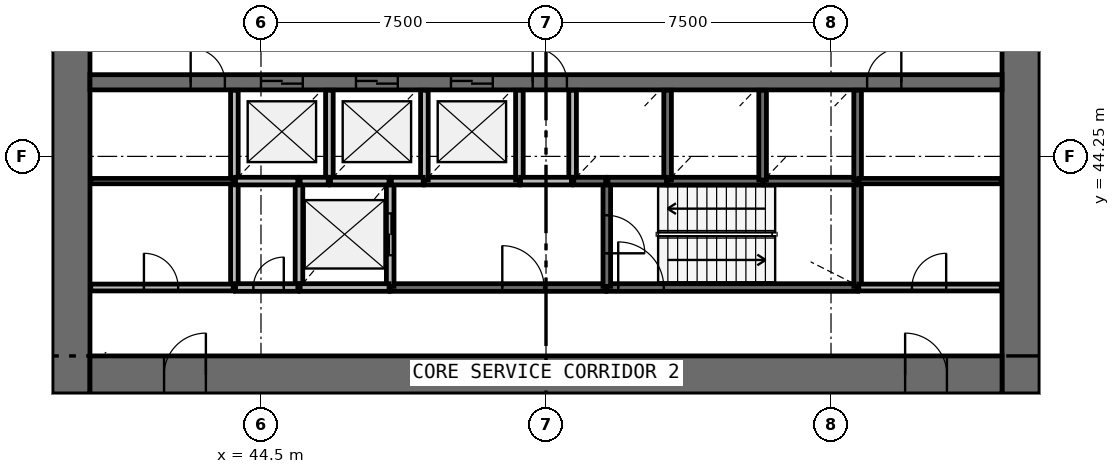
"""IFC4 building model, lengths in metres.
Left out: names, types, materials, properties, quantities, classifications, styles, units other than length and angle.
Written with IfcOpenShell. Run it as: python <this file> out.ifc"""

import sys

from ifc_helpers import new_model, si_unit, direction, frame, frame_2d, origin, place, context, subcontext, project, spatial, rectangle, extrude, source, transform, mapped, element, fill, save


model = new_model("IFC4")
c1 = context("Model", 3, precision=1e-05, world=origin(), true_north=direction((0.0, 1.0)))
c2 = subcontext(c1, "Body", "Model", "MODEL_VIEW")
j1 = project(units=[si_unit("LENGTHUNIT", "METRE"), si_unit("PLANEANGLEUNIT", "RADIAN")], contexts=[c1])
p1 = place(None, origin())
s1 = spatial("IfcSite", under=j1, at=p1, CompositionType="ELEMENT")
p2 = place(p1, origin())
s2 = spatial("IfcBuilding", under=s1, at=p2, CompositionType="ELEMENT")
p3 = place(p2, frame((0.0, 0.0, 22.6)))
s3 = spatial("IfcBuildingStorey", under=s2, at=p3, CompositionType="ELEMENT", Elevation=22.6)
p4 = place(p3, frame((64.5, 38.0, 0.0), z_axis=(0.0, 0.0, 1.0), x_axis=(0.0, 1.0, 0.0)))
e1 = element("IfcWall", 1, at=p4, inside=s3, PredefinedType="SHEAR", context=c2, shape_type="SweptSolid", body=[
    extrude(rectangle(XDim=20.0, YDim=1.0, at=frame_2d((10.0, 0.0))), origin(), (0.0, 0.0, 1.0), 4.4),
])
p5 = place(p4, frame((9.1, 0.0, 0.0)))
e2 = element("IfcOpeningElement", 2, at=p5, cuts=e1, PredefinedType="OPENING", context=c2, shape_type="SweptSolid", body=[
    extrude(rectangle(XDim=1.8, YDim=2.1, at=frame_2d((0.9, 1.05))), frame((0.0, 0.51, 0.0), z_axis=(0.0, -1.0, 0.0), x_axis=(1.0, 0.0, 0.0)), (0.0, 0.0, 1.0), 1.02),
])
p6 = place(p3, frame((39.5, 58.0, 0.0), z_axis=(0.0, 0.0, 1.0), x_axis=(0.0, -1.0, 0.0)))
e3 = element("IfcWall", 3, at=p6, inside=s3, PredefinedType="SHEAR", context=c2, shape_type="SweptSolid", body=[
    extrude(rectangle(XDim=20.0, YDim=1.0, at=frame_2d((10.0, 0.0))), origin(), (0.0, 0.0, 1.0), 4.4),
])
p7 = place(p6, frame((9.1, 0.0, 0.0)))
e4 = element("IfcOpeningElement", 4, at=p7, cuts=e3, PredefinedType="OPENING", context=c2, shape_type="SweptSolid", body=[
    extrude(rectangle(XDim=1.8, YDim=2.1, at=frame_2d((0.9, 1.05))), frame((0.0, 0.51, 0.0), z_axis=(0.0, -1.0, 0.0), x_axis=(1.0, 0.0, 0.0)), (0.0, 0.0, 1.0), 1.02),
])
p8 = place(p3, frame((40.0, 38.5, 0.0), z_axis=(0.0, 0.0, 1.0), x_axis=(1.0, 0.0, 0.0)))
e5 = element("IfcWall", 5, at=p8, inside=s3, PredefinedType="SHEAR", context=c2, shape_type="SweptSolid", body=[
    extrude(rectangle(XDim=24.0, YDim=1.0, at=frame_2d((12.0, 0.0))), origin(), (0.0, 0.0, 1.0), 4.4),
])
p9 = place(p8, frame((21.45, 0.0, 0.0)))
e6 = element("IfcOpeningElement", 6, at=p9, cuts=e5, PredefinedType="OPENING", context=c2, shape_type="SweptSolid", body=[
    extrude(rectangle(XDim=1.1, YDim=2.1, at=frame_2d((0.55, 1.05))), frame((0.0, 0.51, 0.0), z_axis=(0.0, -1.0, 0.0), x_axis=(1.0, 0.0, 0.0)), (0.0, 0.0, 1.0), 1.02),
])
p10 = place(p8, frame((1.95, 0.0, 0.0)))
e7 = element("IfcOpeningElement", 7, at=p10, cuts=e5, PredefinedType="OPENING", context=c2, shape_type="SweptSolid", body=[
    extrude(rectangle(XDim=1.1, YDim=2.1, at=frame_2d((0.55, 1.05))), frame((0.0, 0.51, 0.0), z_axis=(0.0, -1.0, 0.0), x_axis=(1.0, 0.0, 0.0)), (0.0, 0.0, 1.0), 1.02),
])
p11 = place(p3, frame((40.0, 46.2, 0.0), z_axis=(0.0, 0.0, 1.0), x_axis=(1.0, 0.0, 0.0)))
e8 = element("IfcWall", 8, at=p11, inside=s3, PredefinedType="SHEAR", context=c2, shape_type="SweptSolid", body=[
    extrude(rectangle(XDim=24.0, YDim=0.4, at=frame_2d((12.0, 0.0))), origin(), (0.0, 0.0, 1.0), 4.4),
])
p12 = place(p11, frame((4.5, 0.0, 0.0)))
e9 = element("IfcOpeningElement", 9, at=p12, cuts=e8, PredefinedType="OPENING", context=c2, shape_type="SweptSolid", body=[
    extrude(rectangle(XDim=1.1, YDim=2.1, at=frame_2d((0.55, 1.05))), frame((0.0, 0.21, 0.0), z_axis=(0.0, -1.0, 0.0), x_axis=(1.0, 0.0, 0.0)), (0.0, 0.0, 1.0), 0.42),
])
p13 = place(p11, frame((7.0, 0.0, 0.0)))
e10 = element("IfcOpeningElement", 10, at=p13, cuts=e8, PredefinedType="OPENING", context=c2, shape_type="SweptSolid", body=[
    extrude(rectangle(XDim=1.1, YDim=2.1, at=frame_2d((0.55, 1.05))), frame((0.0, 0.21, 0.0), z_axis=(0.0, -1.0, 0.0), x_axis=(1.0, 0.0, 0.0)), (0.0, 0.0, 1.0), 0.42),
])
p14 = place(p11, frame((9.5, 0.0, 0.0)))
e11 = element("IfcOpeningElement", 11, at=p14, cuts=e8, PredefinedType="OPENING", context=c2, shape_type="SweptSolid", body=[
    extrude(rectangle(XDim=1.1, YDim=2.1, at=frame_2d((0.55, 1.05))), frame((0.0, 0.21, 0.0), z_axis=(0.0, -1.0, 0.0), x_axis=(1.0, 0.0, 0.0)), (0.0, 0.0, 1.0), 0.42),
])
p15 = place(p11, frame((20.45, 0.0, 0.0)))
e12 = element("IfcOpeningElement", 12, at=p15, cuts=e8, PredefinedType="OPENING", context=c2, shape_type="SweptSolid", body=[
    extrude(rectangle(XDim=0.9, YDim=2.1, at=frame_2d((0.45, 1.05))), frame((0.0, 0.21, 0.0), z_axis=(0.0, -1.0, 0.0), x_axis=(1.0, 0.0, 0.0)), (0.0, 0.0, 1.0), 0.42),
])
p16 = place(p11, frame((2.65, 0.0, 0.0)))
e13 = element("IfcOpeningElement", 13, at=p16, cuts=e8, PredefinedType="OPENING", context=c2, shape_type="SweptSolid", body=[
    extrude(rectangle(XDim=0.9, YDim=2.1, at=frame_2d((0.45, 1.05))), frame((0.0, 0.21, 0.0), z_axis=(0.0, -1.0, 0.0), x_axis=(1.0, 0.0, 0.0)), (0.0, 0.0, 1.0), 0.42),
])
p17 = place(p11, frame((11.65, 0.0, 0.0)))
e14 = element("IfcOpeningElement", 14, at=p17, cuts=e8, PredefinedType="OPENING", context=c2, shape_type="SweptSolid", body=[
    extrude(rectangle(XDim=0.9, YDim=2.1, at=frame_2d((0.45, 1.05))), frame((0.0, 0.21, 0.0), z_axis=(0.0, -1.0, 0.0), x_axis=(1.0, 0.0, 0.0)), (0.0, 0.0, 1.0), 0.42),
])
p18 = place(p3, frame((53.6, 40.8, 0.0), z_axis=(0.0, 0.0, 1.0), x_axis=(1.0, 0.0, 0.0)))
e15 = element("IfcWall", 15, at=p18, inside=s3, PredefinedType="SOLIDWALL", context=c2, shape_type="SweptSolid", body=[
    extrude(rectangle(XDim=6.6, YDim=0.2, at=frame_2d((3.3, 0.0))), origin(), (0.0, 0.0, 1.0), 3.95),
])
p19 = place(p18, frame((0.3, 0.0, 0.0)))
e16 = element("IfcOpeningElement", 16, at=p19, cuts=e15, PredefinedType="OPENING", context=c2, shape_type="SweptSolid", body=[
    extrude(rectangle(XDim=1.2, YDim=2.1, at=frame_2d((0.6, 1.05))), frame((0.0, 0.11, 0.0), z_axis=(0.0, -1.0, 0.0), x_axis=(1.0, 0.0, 0.0)), (0.0, 0.0, 1.0), 0.22),
])
p20 = place(p3, frame((47.9, 40.8, 0.0), z_axis=(0.0, 0.0, 1.0), x_axis=(1.0, 0.0, 0.0)))
e17 = element("IfcWall", 17, at=p20, inside=s3, PredefinedType="SOLIDWALL", context=c2, shape_type="SweptSolid", body=[
    extrude(rectangle(XDim=5.67, YDim=0.2, at=frame_2d((2.835, 0.0))), origin(), (0.0, 0.0, 1.0), 3.95),
])
p21 = place(p20, frame((2.95, 0.0, 0.0)))
e18 = element("IfcOpeningElement", 18, at=p21, cuts=e17, PredefinedType="OPENING", context=c2, shape_type="SweptSolid", body=[
    extrude(rectangle(XDim=1.1, YDim=2.1, at=frame_2d((0.55, 1.05))), frame((0.0, 0.11, 0.0), z_axis=(0.0, -1.0, 0.0), x_axis=(1.0, 0.0, 0.0)), (0.0, 0.0, 1.0), 0.22),
])
for number, where, z_axis, x_axis in (
    (19, (43.8, 43.6, 0.0), (0.0, 0.0, 1.0), (0.0, -1.0, 0.0)),
    (20, (45.5, 43.6, 0.0), (0.0, 0.0, 1.0), (0.0, -1.0, 0.0)),
):
    element("IfcWall", number, at=place(p3, frame(where, z_axis=z_axis, x_axis=x_axis)), inside=s3, PredefinedType="SOLIDWALL", context=c2, shape_type="SweptSolid", body=[
        extrude(rectangle(XDim=2.8, YDim=0.2, at=frame_2d((1.4, 0.0))), origin(), (0.0, 0.0, 1.0), 3.95),
    ])
p22 = place(p3, frame((47.9, 40.83, 0.0), z_axis=(0.0, 0.0, 1.0), x_axis=(0.0, 1.0, 0.0)))
e21 = element("IfcWall", 21, at=p22, inside=s3, PredefinedType="SOLIDWALL", context=c2, shape_type="SweptSolid", body=[
    extrude(rectangle(XDim=2.77, YDim=0.2, at=frame_2d((1.385, 0.0))), origin(), (0.0, 0.0, 1.0), 3.95),
])
p23 = place(p22, frame((0.82, 0.0, 0.0)))
e22 = element("IfcOpeningElement", 22, at=p23, cuts=e21, PredefinedType="OPENING", context=c2, shape_type="SweptSolid", body=[
    extrude(rectangle(XDim=1.1, YDim=2.1, at=frame_2d((0.55, 1.05))), frame((0.0, 0.11, 0.0), z_axis=(0.0, -1.0, 0.0), x_axis=(1.0, 0.0, 0.0)), (0.0, 0.0, 1.0), 0.22),
])
p24 = place(p3, frame((60.2, 40.83, 0.0), z_axis=(0.0, 0.0, 1.0), x_axis=(0.0, 1.0, 0.0)))
e23 = element("IfcWall", 23, at=p24, inside=s3, PredefinedType="SOLIDWALL", context=c2, shape_type="SweptSolid", body=[
    extrude(rectangle(XDim=2.77, YDim=0.2, at=frame_2d((1.385, 0.0))), origin(), (0.0, 0.0, 1.0), 3.95),
])
p25 = place(p3, frame((53.6, 43.6, 0.0), z_axis=(0.0, 0.0, 1.0), x_axis=(0.0, -1.0, 0.0)))
e24 = element("IfcWall", 24, at=p25, inside=s3, PredefinedType="SOLIDWALL", context=c2, shape_type="SweptSolid", body=[
    extrude(rectangle(XDim=2.77, YDim=0.2, at=frame_2d((1.385, 0.0))), origin(), (0.0, 0.0, 1.0), 3.95),
])
p26 = place(p25, frame((0.9, 0.0, 0.0)))
e25 = element("IfcOpeningElement", 25, at=p26, cuts=e24, PredefinedType="OPENING", context=c2, shape_type="SweptSolid", body=[
    extrude(rectangle(XDim=1.0, YDim=2.1, at=frame_2d((0.5, 1.05))), frame((0.0, 0.11, 0.0), z_axis=(0.0, -1.0, 0.0), x_axis=(1.0, 0.0, 0.0)), (0.0, 0.0, 1.0), 0.22),
])
for number, where, z_axis, x_axis in (
    (26, (48.8, 43.6, 0.0), (0.0, 0.0, 1.0), (1.0, 0.0, 0.0)),
    (27, (55.2, 43.6, 0.0), (0.0, 0.0, 1.0), (1.0, 0.0, 0.0)),
):
    element("IfcWall", number, at=place(p3, frame(where, z_axis=z_axis, x_axis=x_axis)), inside=s3, PredefinedType="SOLIDWALL", context=c2, shape_type="SweptSolid", body=[
        extrude(rectangle(XDim=2.5, YDim=0.2, at=frame_2d((1.25, 0.0))), origin(), (0.0, 0.0, 1.0), 3.95),
    ])
p27 = place(p3, frame((57.73, 43.6, 0.0), z_axis=(0.0, 0.0, 1.0), x_axis=(1.0, 0.0, 0.0)))
e28 = element("IfcWall", 28, at=p27, inside=s3, PredefinedType="SOLIDWALL", context=c2, shape_type="SweptSolid", body=[
    extrude(rectangle(XDim=2.44, YDim=0.2, at=frame_2d((1.22, 0.0))), origin(), (0.0, 0.0, 1.0), 3.95),
])
p28 = place(p3, frame((45.53, 40.8, 0.0), z_axis=(0.0, 0.0, 1.0), x_axis=(1.0, 0.0, 0.0)))
e29 = element("IfcWall", 29, at=p28, inside=s3, PredefinedType="SOLIDWALL", context=c2, shape_type="SweptSolid", body=[
    extrude(rectangle(XDim=2.34, YDim=0.2, at=frame_2d((1.17, 0.0))), origin(), (0.0, 0.0, 1.0), 3.95),
])
p29 = place(p3, frame((43.8, 45.99, 0.0), z_axis=(0.0, 0.0, 1.0), x_axis=(0.0, -1.0, 0.0)))
e30 = element("IfcWall", 30, at=p29, inside=s3, PredefinedType="SOLIDWALL", context=c2, shape_type="SweptSolid", body=[
    extrude(rectangle(XDim=2.36, YDim=0.2, at=frame_2d((1.18, 0.0))), origin(), (0.0, 0.0, 1.0), 3.95),
])
p30 = place(p3, frame((46.3, 43.6, 0.0), z_axis=(0.0, 0.0, 1.0), x_axis=(0.0, 1.0, 0.0)))
e31 = element("IfcWall", 31, at=p30, inside=s3, PredefinedType="SOLIDWALL", context=c2, shape_type="SweptSolid", body=[
    extrude(rectangle(XDim=2.39, YDim=0.2, at=frame_2d((1.195, 0.0))), origin(), (0.0, 0.0, 1.0), 3.95),
])
for number, where, z_axis, x_axis in (
    (32, (48.8, 43.63, 0.0), (0.0, 0.0, 1.0), (0.0, 1.0, 0.0)),
    (33, (51.3, 43.63, 0.0), (0.0, 0.0, 1.0), (0.0, 1.0, 0.0)),
):
    element("IfcWall", number, at=place(p3, frame(where, z_axis=z_axis, x_axis=x_axis)), inside=s3, PredefinedType="SOLIDWALL", context=c2, shape_type="SweptSolid", body=[
        extrude(rectangle(XDim=2.36, YDim=0.2, at=frame_2d((1.18, 0.0))), origin(), (0.0, 0.0, 1.0), 3.95),
    ])
p31 = place(p3, frame((52.7, 45.99, 0.0), z_axis=(0.0, 0.0, 1.0), x_axis=(0.0, -1.0, 0.0)))
e34 = element("IfcWall", 34, at=p31, inside=s3, PredefinedType="SOLIDWALL", context=c2, shape_type="SweptSolid", body=[
    extrude(rectangle(XDim=2.39, YDim=0.2, at=frame_2d((1.195, 0.0))), origin(), (0.0, 0.0, 1.0), 3.95),
])
for number, where, z_axis, x_axis in (
    (35, (55.2, 43.63, 0.0), (0.0, 0.0, 1.0), (0.0, 1.0, 0.0)),
    (36, (57.7, 43.63, 0.0), (0.0, 0.0, 1.0), (0.0, 1.0, 0.0)),
    (37, (60.2, 43.63, 0.0), (0.0, 0.0, 1.0), (0.0, 1.0, 0.0)),
):
    element("IfcWall", number, at=place(p3, frame(where, z_axis=z_axis, x_axis=x_axis)), inside=s3, PredefinedType="SOLIDWALL", context=c2, shape_type="SweptSolid", body=[
        extrude(rectangle(XDim=2.36, YDim=0.2, at=frame_2d((1.18, 0.0))), origin(), (0.0, 0.0, 1.0), 3.95),
    ])
p32 = place(p3, frame((43.83, 43.6, 0.0), z_axis=(0.0, 0.0, 1.0), x_axis=(1.0, 0.0, 0.0)))
e38 = element("IfcWall", 38, at=p32, inside=s3, PredefinedType="SOLIDWALL", context=c2, shape_type="SweptSolid", body=[
    extrude(rectangle(XDim=1.64, YDim=0.2, at=frame_2d((0.82, 0.0))), origin(), (0.0, 0.0, 1.0), 3.95),
])
p33 = place(p3, frame((43.83, 40.8, 0.0), z_axis=(0.0, 0.0, 1.0), x_axis=(1.0, 0.0, 0.0)))
e39 = element("IfcWall", 39, at=p33, inside=s3, PredefinedType="SOLIDWALL", context=c2, shape_type="SweptSolid", body=[
    extrude(rectangle(XDim=1.64, YDim=0.2, at=frame_2d((0.82, 0.0))), origin(), (0.0, 0.0, 1.0), 3.95),
])
p34 = place(p33, frame((0.47, 0.0, 0.0)))
e40 = element("IfcOpeningElement", 40, at=p34, cuts=e39, PredefinedType="OPENING", context=c2, shape_type="SweptSolid", body=[
    extrude(rectangle(XDim=0.8, YDim=2.1, at=frame_2d((0.4, 1.05))), frame((0.0, 0.11, 0.0), z_axis=(0.0, -1.0, 0.0), x_axis=(1.0, 0.0, 0.0)), (0.0, 0.0, 1.0), 0.22),
])
for number, where, z_axis, x_axis in (
    (41, (46.33, 43.6, 0.0), (0.0, 0.0, 1.0), (1.0, 0.0, 0.0)),
    (42, (53.63, 43.6, 0.0), (0.0, 0.0, 1.0), (1.0, 0.0, 0.0)),
):
    element("IfcWall", number, at=place(p3, frame(where, z_axis=z_axis, x_axis=x_axis)), inside=s3, PredefinedType="SOLIDWALL", context=c2, shape_type="SweptSolid", body=[
        extrude(rectangle(XDim=1.54, YDim=0.2, at=frame_2d((0.77, 0.0))), origin(), (0.0, 0.0, 1.0), 3.95),
    ])
p35 = place(p3, frame((52.67, 43.6, 0.0), z_axis=(0.0, 0.0, 1.0), x_axis=(-1.0, 0.0, 0.0)))
e43 = element("IfcWall", 43, at=p35, inside=s3, PredefinedType="SOLIDWALL", context=c2, shape_type="SweptSolid", body=[
    extrude(rectangle(XDim=1.34, YDim=0.2, at=frame_2d((0.67, 0.0))), origin(), (0.0, 0.0, 1.0), 3.95),
])
for number, where, z_axis, x_axis in (
    (44, (47.93, 43.6, 0.0), (0.0, 0.0, 1.0), (1.0, 0.0, 0.0)),
    (45, (52.73, 43.6, 0.0), (0.0, 0.0, 1.0), (1.0, 0.0, 0.0)),
):
    element("IfcWall", number, at=place(p3, frame(where, z_axis=z_axis, x_axis=x_axis)), inside=s3, PredefinedType="SOLIDWALL", context=c2, shape_type="SweptSolid", body=[
        extrude(rectangle(XDim=0.84, YDim=0.2, at=frame_2d((0.42, 0.0))), origin(), (0.0, 0.0, 1.0), 3.95),
    ])
p36 = place(p3, frame((45.53, 43.6, 0.0), z_axis=(0.0, 0.0, 1.0), x_axis=(1.0, 0.0, 0.0)))
e46 = element("IfcWall", 46, at=p36, inside=s3, PredefinedType="SOLIDWALL", context=c2, shape_type="SweptSolid", body=[
    extrude(rectangle(XDim=0.74, YDim=0.2, at=frame_2d((0.37, 0.0))), origin(), (0.0, 0.0, 1.0), 3.95),
])
p37 = place(p3, frame((40.02, 40.8, 0.0), z_axis=(0.0, 0.0, 1.0), x_axis=(1.0, 0.0, 0.0)))
e47 = element("IfcWall", 47, at=p37, inside=s3, PredefinedType="PARTITIONING", context=c2, shape_type="SweptSolid", body=[
    extrude(rectangle(XDim=3.75, YDim=0.18, at=frame_2d((1.875, 0.0))), origin(), (0.0, 0.0, 1.0), 3.95),
])
p38 = place(p37, frame((1.4, 0.0, 0.0)))
e48 = element("IfcOpeningElement", 48, at=p38, cuts=e47, PredefinedType="OPENING", context=c2, shape_type="SweptSolid", body=[
    extrude(rectangle(XDim=0.9, YDim=2.1, at=frame_2d((0.45, 1.05))), frame((0.0, 0.1, 0.0), z_axis=(0.0, -1.0, 0.0), x_axis=(1.0, 0.0, 0.0)), (0.0, 0.0, 1.0), 0.2),
])
p39 = place(p3, frame((60.23, 40.8, 0.0), z_axis=(0.0, 0.0, 1.0), x_axis=(1.0, 0.0, 0.0)))
e49 = element("IfcWall", 49, at=p39, inside=s3, PredefinedType="PARTITIONING", context=c2, shape_type="SweptSolid", body=[
    extrude(rectangle(XDim=3.75, YDim=0.18, at=frame_2d((1.875, 0.0))), origin(), (0.0, 0.0, 1.0), 3.95),
])
p40 = place(p39, frame((1.4, 0.0, 0.0)))
e50 = element("IfcOpeningElement", 50, at=p40, cuts=e49, PredefinedType="OPENING", context=c2, shape_type="SweptSolid", body=[
    extrude(rectangle(XDim=0.9, YDim=2.1, at=frame_2d((0.45, 1.05))), frame((0.0, 0.1, 0.0), z_axis=(0.0, -1.0, 0.0), x_axis=(1.0, 0.0, 0.0)), (0.0, 0.0, 1.0), 0.2),
])
for number, where, z_axis, x_axis in (
    (51, (43.77, 43.6, 0.0), (0.0, 0.0, 1.0), (-1.0, 0.0, 0.0)),
    (52, (60.23, 43.6, 0.0), (0.0, 0.0, 1.0), (1.0, 0.0, 0.0)),
):
    element("IfcWall", number, at=place(p3, frame(where, z_axis=z_axis, x_axis=x_axis)), inside=s3, PredefinedType="PARTITIONING", context=c2, shape_type="SweptSolid", body=[
        extrude(rectangle(XDim=3.75, YDim=0.14, at=frame_2d((1.875, 0.0))), origin(), (0.0, 0.0, 1.0), 3.05),
    ])
m1 = source(origin(), c2, "Body", "SweptSolid", [
    extrude(rectangle(XDim=1.1, YDim=2.1, at=frame_2d((0.55, 1.05))), frame((0.0, 0.025, 0.0), z_axis=(0.0, -1.0, 0.0), x_axis=(1.0, 0.0, 0.0)), (0.0, 0.0, 1.0), 0.05),
])
p41 = place(p12, origin())
e53 = element("IfcDoor", 53, at=p41, inside=s3, OperationType="DOUBLE_DOOR_SLIDING", PredefinedType="USERDEFINED", context=c2, shape_type="MappedRepresentation", body=[
    mapped(m1, transform((0.0, 0.0, 0.0), scale=1.0)),
])
fill(e9, e53)
p42 = place(p13, origin())
e54 = element("IfcDoor", 54, at=p42, inside=s3, OperationType="DOUBLE_DOOR_SLIDING", PredefinedType="USERDEFINED", context=c2, shape_type="MappedRepresentation", body=[
    mapped(m1, transform((0.0, 0.0, 0.0), scale=1.0)),
])
fill(e10, e54)
p43 = place(p14, origin())
e55 = element("IfcDoor", 55, at=p43, inside=s3, OperationType="DOUBLE_DOOR_SLIDING", PredefinedType="USERDEFINED", context=c2, shape_type="MappedRepresentation", body=[
    mapped(m1, transform((0.0, 0.0, 0.0), scale=1.0)),
])
fill(e11, e55)
p44 = place(p23, origin())
e56 = element("IfcDoor", 56, at=p44, inside=s3, OperationType="DOUBLE_DOOR_SLIDING", PredefinedType="USERDEFINED", context=c2, shape_type="MappedRepresentation", body=[
    mapped(m1, transform((0.0, 0.0, 0.0), scale=1.0)),
])
fill(e22, e56)
m2 = source(origin(), c2, "Body", "SweptSolid", [
    extrude(rectangle(XDim=1.2, YDim=2.1, at=frame_2d((0.6, 1.05))), frame((0.0, 0.025, 0.0), z_axis=(0.0, -1.0, 0.0), x_axis=(1.0, 0.0, 0.0)), (0.0, 0.0, 1.0), 0.05),
])
p45 = place(p19, origin())
e57 = element("IfcDoor", 57, at=p45, inside=s3, OperationType="SINGLE_SWING_LEFT", PredefinedType="DOOR", context=c2, shape_type="MappedRepresentation", body=[
    mapped(m2, transform((0.0, 0.0, 0.0), scale=1.0)),
])
fill(e16, e57)
m3 = source(origin(), c2, "Body", "SweptSolid", [
    extrude(rectangle(XDim=1.0, YDim=2.1, at=frame_2d((0.5, 1.05))), frame((0.0, 0.025, 0.0), z_axis=(0.0, -1.0, 0.0), x_axis=(1.0, 0.0, 0.0)), (0.0, 0.0, 1.0), 0.05),
])
p46 = place(p26, origin())
e58 = element("IfcDoor", 58, at=p46, inside=s3, OperationType="SINGLE_SWING_RIGHT", PredefinedType="DOOR", context=c2, shape_type="MappedRepresentation", body=[
    mapped(m3, transform((0.0, 0.0, 0.0), scale=1.0)),
])
fill(e25, e58)
m4 = source(origin(), c2, "Body", "SweptSolid", [
    extrude(rectangle(XDim=1.1, YDim=2.1, at=frame_2d((0.55, 1.05))), frame((0.0, 0.025, 0.0), z_axis=(0.0, -1.0, 0.0), x_axis=(1.0, 0.0, 0.0)), (0.0, 0.0, 1.0), 0.05),
])
p47 = place(p21, origin())
e59 = element("IfcDoor", 59, at=p47, inside=s3, OperationType="SINGLE_SWING_LEFT", PredefinedType="DOOR", context=c2, shape_type="MappedRepresentation", body=[
    mapped(m4, transform((0.0, 0.0, 0.0), scale=1.0)),
])
fill(e18, e59)
m5 = source(origin(), c2, "Body", "SweptSolid", [
    extrude(rectangle(XDim=0.8, YDim=2.1, at=frame_2d((0.4, 1.05))), frame((0.0, 0.025, 0.0), z_axis=(0.0, -1.0, 0.0), x_axis=(1.0, 0.0, 0.0)), (0.0, 0.0, 1.0), 0.05),
])
p48 = place(p34, origin())
e60 = element("IfcDoor", 60, at=p48, inside=s3, OperationType="SINGLE_SWING_RIGHT", PredefinedType="DOOR", context=c2, shape_type="MappedRepresentation", body=[
    mapped(m5, transform((0.0, 0.0, 0.0), scale=1.0)),
])
fill(e40, e60)
m6 = source(origin(), c2, "Body", "SweptSolid", [
    extrude(rectangle(XDim=1.1, YDim=2.1, at=frame_2d((0.55, 1.05))), frame((0.0, 0.025, 0.0), z_axis=(0.0, -1.0, 0.0), x_axis=(1.0, 0.0, 0.0)), (0.0, 0.0, 1.0), 0.05),
])
p49 = place(p9, origin())
e61 = element("IfcDoor", 61, at=p49, inside=s3, OperationType="SINGLE_SWING_LEFT", PredefinedType="DOOR", context=c2, shape_type="MappedRepresentation", body=[
    mapped(m6, transform((0.0, 0.0, 0.0), scale=1.0)),
])
fill(e6, e61)
p50 = place(p10, origin())
e62 = element("IfcDoor", 62, at=p50, inside=s3, OperationType="SINGLE_SWING_RIGHT", PredefinedType="DOOR", context=c2, shape_type="MappedRepresentation", body=[
    mapped(m6, transform((0.0, 0.0, 0.0), scale=1.0)),
])
fill(e7, e62)
m7 = source(origin(), c2, "Body", "SweptSolid", [
    extrude(rectangle(XDim=0.9, YDim=2.1, at=frame_2d((0.45, 1.05))), frame((0.0, 0.025, 0.0), z_axis=(0.0, -1.0, 0.0), x_axis=(1.0, 0.0, 0.0)), (0.0, 0.0, 1.0), 0.05),
])
p51 = place(p38, origin())
e63 = element("IfcDoor", 63, at=p51, inside=s3, OperationType="SINGLE_SWING_LEFT", PredefinedType="DOOR", context=c2, shape_type="MappedRepresentation", body=[
    mapped(m7, transform((0.0, 0.0, 0.0), scale=1.0)),
])
fill(e48, e63)
p52 = place(p15, origin())
e64 = element("IfcDoor", 64, at=p52, inside=s3, OperationType="SINGLE_SWING_RIGHT", PredefinedType="DOOR", context=c2, shape_type="MappedRepresentation", body=[
    mapped(m7, transform((0.0, 0.0, 0.0), scale=1.0)),
])
fill(e12, e64)
p53 = place(p40, origin())
e65 = element("IfcDoor", 65, at=p53, inside=s3, OperationType="SINGLE_SWING_RIGHT", PredefinedType="DOOR", context=c2, shape_type="MappedRepresentation", body=[
    mapped(m7, transform((0.0, 0.0, 0.0), scale=1.0)),
])
fill(e50, e65)
p54 = place(p16, origin())
e66 = element("IfcDoor", 66, at=p54, inside=s3, OperationType="SINGLE_SWING_LEFT", PredefinedType="DOOR", context=c2, shape_type="MappedRepresentation", body=[
    mapped(m7, transform((0.0, 0.0, 0.0), scale=1.0)),
])
fill(e13, e66)
p55 = place(p17, origin())
e67 = element("IfcDoor", 67, at=p55, inside=s3, OperationType="SINGLE_SWING_LEFT", PredefinedType="DOOR", context=c2, shape_type="MappedRepresentation", body=[
    mapped(m7, transform((0.0, 0.0, 0.0), scale=1.0)),
])
fill(e14, e67)
save(model, sys.argv[1])
